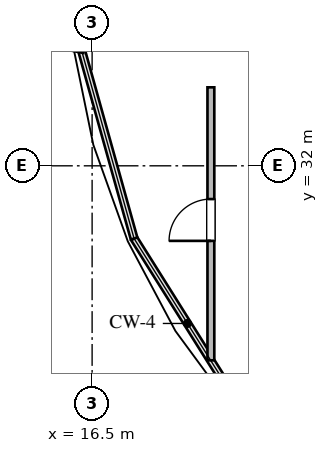
"""IFC4 building model, lengths in metres.
Left out: names, types, materials, properties, quantities, classifications, styles, units other than length and angle.
Written with IfcOpenShell. Run it as: python <this file> out.ifc"""

import sys

from ifc_helpers import new_model, si_unit, direction, frame, frame_2d, origin, place, context, subcontext, project, spatial, rectangle, extrude, element, fill, save


model = new_model("IFC4")
c1 = context("Model", 3, precision=1e-05, world=origin(), true_north=direction((0.0, 1.0)))
c2 = subcontext(c1, "Body", "Model", "MODEL_VIEW")
j1 = project(units=[si_unit("LENGTHUNIT", "METRE"), si_unit("PLANEANGLEUNIT", "RADIAN")], contexts=[c1])
p1 = place(None, origin())
s1 = spatial("IfcSite", under=j1, at=p1, CompositionType="ELEMENT")
p2 = place(p1, origin())
s2 = spatial("IfcBuilding", under=s1, at=p2, CompositionType="ELEMENT")
p3 = place(p2, frame((0.0, 0.0, 285.2)))
s3 = spatial("IfcBuildingStorey", under=s2, at=p3, CompositionType="ELEMENT", Elevation=285.2)
p4 = place(p3, frame((16.111, 34.999, 0.0), z_axis=(0.0, 0.0, 1.0), x_axis=(0.196720235208, 0.980459662128, 0.0)))
e1 = element("IfcWall", 1, at=p4, inside=s3, PredefinedType="STANDARD", context=c2, shape_type="SweptSolid", body=[
    extrude(rectangle(XDim=14.299, YDim=0.32, at=frame_2d((7.15, 0.0))), origin(), (0.0, 0.0, 1.0), 3.56),
])
p5 = place(p3, frame((19.625, 26.881, 0.0), z_axis=(0.0, 0.0, 1.0), x_axis=(0.0, 1.0, 0.0)))
e2 = element("IfcWall", 2, at=p5, inside=s3, PredefinedType="PARTITIONING", context=c2, shape_type="SweptSolid", body=[
    extrude(rectangle(XDim=7.184, YDim=0.18, at=frame_2d((3.592, 0.0))), origin(), (0.0, 0.0, 1.0), 3.017),
])
p6 = place(p5, frame((3.144, 0.0, 0.0)))
e3 = element("IfcOpeningElement", 3, at=p6, cuts=e2, PredefinedType="OPENING", context=c2, shape_type="SweptSolid", body=[
    extrude(rectangle(XDim=1.1, YDim=2.1, at=frame_2d((0.55, 1.05))), frame((0.0, 0.1, 0.0), z_axis=(0.0, -1.0, 0.0), x_axis=(1.0, 0.0, 0.0)), (0.0, 0.0, 1.0), 0.2),
])
p7 = place(p6, origin())
e4 = element("IfcDoor", 4, at=p7, inside=s3, OperationType="SINGLE_SWING_LEFT", PredefinedType="DOOR", context=c2, shape_type="SweptSolid", body=[
    extrude(rectangle(XDim=1.1, YDim=2.1, at=frame_2d((0.55, 1.05))), frame((0.0, 0.025, 0.0), z_axis=(0.0, -1.0, 0.0), x_axis=(1.0, 0.0, 0.0)), (0.0, 0.0, 1.0), 0.05),
])
fill(e3, e4)
save(model, sys.argv[1])
